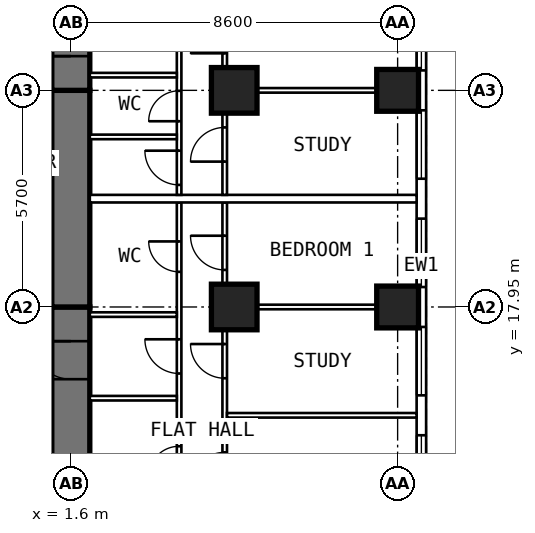
"""IFC4 building model, lengths in metres.
Left out: names, types, materials, properties, quantities, classifications, styles, units other than length and angle.
Written with IfcOpenShell. Run it as: python <this file> out.ifc"""

import sys

from ifc_helpers import new_model, si_unit, direction, frame, frame_2d, origin, origin_2d, place, context, subcontext, project, spatial, rectangle, extrude, element, fill, save


model = new_model("IFC4")
c1 = context("Model", 3, precision=1e-05, world=origin(), true_north=direction((0.0, 1.0)))
c2 = subcontext(c1, "Body", "Model", "MODEL_VIEW")
j1 = project(units=[si_unit("LENGTHUNIT", "METRE"), si_unit("PLANEANGLEUNIT", "RADIAN")], contexts=[c1])
p1 = place(None, origin())
s1 = spatial("IfcSite", under=j1, at=p1, CompositionType="ELEMENT")
p2 = place(p1, origin())
s2 = spatial("IfcBuilding", under=s1, at=p2, CompositionType="ELEMENT")
p3 = place(p2, frame((0.0, 0.0, 28.8)))
s3 = spatial("IfcBuildingStorey", under=s2, at=p3, CompositionType="ELEMENT", Elevation=28.8)
for number, where, z_axis, x_axis in (
    (1, (10.2, 17.95, 0.0), (0.0, 0.0, 1.0), (0.0, 1.0, 0.0)),
    (2, (10.2, 23.65, 0.0), (0.0, 0.0, 1.0), (0.0, 1.0, 0.0)),
):
    element("IfcColumn", number, at=place(p3, frame(where, z_axis=z_axis, x_axis=x_axis)), inside=s3, PredefinedType="COLUMN", context=c2, shape_type="SweptSolid", body=[
        extrude(rectangle(XDim=1.1, YDim=1.1, at=origin_2d()), origin(), (0.0, 0.0, 1.0), 3.6),
    ])
for number, where, z_axis, x_axis in (
    (3, (5.9, 17.95, 0.0), (0.0, 0.0, 1.0), (0.0, 1.0, 0.0)),
    (4, (5.9, 23.65, 0.0), (0.0, 0.0, 1.0), (0.0, 1.0, 0.0)),
):
    element("IfcColumn", number, at=place(p3, frame(where, z_axis=z_axis, x_axis=x_axis)), inside=s3, PredefinedType="COLUMN", context=c2, shape_type="SweptSolid", body=[
        extrude(rectangle(XDim=1.2, YDim=1.2, at=origin_2d()), origin(), (0.0, 0.0, 1.0), 3.6),
    ])
p4 = place(p3, frame((1.6, 9.6, 0.0), z_axis=(0.0, 0.0, 1.0), x_axis=(0.0, 1.0, 0.0)))
e5 = element("IfcWall", 5, at=p4, inside=s3, PredefinedType="SHEAR", context=c2, shape_type="SweptSolid", body=[
    extrude(rectangle(XDim=8.35, YDim=1.0, at=frame_2d((4.175, 0.0))), origin(), (0.0, 0.0, 1.0), 3.6),
])
p5 = place(p4, frame((6.45, 0.0, 0.0)))
e6 = element("IfcOpeningElement", 6, at=p5, cuts=e5, PredefinedType="OPENING", context=c2, shape_type="SweptSolid", body=[
    extrude(rectangle(XDim=1.0, YDim=2.1, at=frame_2d((0.5, 1.05))), frame((0.0, 0.512, 0.0), z_axis=(0.0, -1.0, 0.0), x_axis=(1.0, 0.0, 0.0)), (0.0, 0.0, 1.0), 1.024),
])
p6 = place(p3, frame((1.6, 17.95, 0.0), z_axis=(0.0, 0.0, 1.0), x_axis=(0.0, 1.0, 0.0)))
e7 = element("IfcWall", 7, at=p6, inside=s3, PredefinedType="SHEAR", context=c2, shape_type="SweptSolid", body=[
    extrude(rectangle(XDim=5.7, YDim=1.0, at=frame_2d((2.85, 0.0))), origin(), (0.0, 0.0, 1.0), 3.6),
])
p7 = place(p3, frame((1.6, 23.65, 0.0), z_axis=(0.0, 0.0, 1.0), x_axis=(0.0, 1.0, 0.0)))
e8 = element("IfcWall", 8, at=p7, inside=s3, PredefinedType="SHEAR", context=c2, shape_type="SweptSolid", body=[
    extrude(rectangle(XDim=10.745, YDim=1.0, at=frame_2d((5.373, 0.0))), origin(), (0.0, 0.0, 1.0), 3.6),
])
p8 = place(p7, frame((0.9, 0.0, 0.0)))
e9 = element("IfcOpeningElement", 9, at=p8, cuts=e8, PredefinedType="OPENING", context=c2, shape_type="SweptSolid", body=[
    extrude(rectangle(XDim=1.0, YDim=2.1, at=frame_2d((0.5, 1.05))), frame((0.0, 0.512, 0.0), z_axis=(0.0, -1.0, 0.0), x_axis=(1.0, 0.0, 0.0)), (0.0, 0.0, 1.0), 1.024),
])
p9 = place(p3, frame((10.825, 6.409, 0.0), z_axis=(0.0, 0.0, 1.0), x_axis=(0.0, 1.0, 0.0)))
e10 = element("IfcWall", 10, at=p9, inside=s3, PredefinedType="SOLIDWALL", context=c2, shape_type="SweptSolid", body=[
    extrude(rectangle(XDim=25.226, YDim=0.25, at=frame_2d((12.613, 0.0))), origin(), (0.0, 0.0, 1.0), 3.3),
])
p10 = place(p9, frame((0.666, 0.0, 0.8)))
e11 = element("IfcOpeningElement", 11, at=p10, cuts=e10, PredefinedType="OPENING", context=c2, shape_type="SweptSolid", body=[
    extrude(rectangle(XDim=1.8, YDim=1.8, at=frame_2d((0.9, 0.9))), frame((0.0, 0.137, 0.0), z_axis=(0.0, -1.0, 0.0), x_axis=(1.0, 0.0, 0.0)), (0.0, 0.0, 1.0), 0.274),
])
p11 = place(p9, frame((3.516, 0.0, 0.8)))
e12 = element("IfcOpeningElement", 12, at=p11, cuts=e10, PredefinedType="OPENING", context=c2, shape_type="SweptSolid", body=[
    extrude(rectangle(XDim=1.8, YDim=1.8, at=frame_2d((0.9, 0.9))), frame((0.0, 0.137, 0.0), z_axis=(0.0, -1.0, 0.0), x_axis=(1.0, 0.0, 0.0)), (0.0, 0.0, 1.0), 0.274),
])
p12 = place(p9, frame((6.366, 0.0, 0.8)))
e13 = element("IfcOpeningElement", 13, at=p12, cuts=e10, PredefinedType="OPENING", context=c2, shape_type="SweptSolid", body=[
    extrude(rectangle(XDim=1.8, YDim=1.8, at=frame_2d((0.9, 0.9))), frame((0.0, 0.137, 0.0), z_axis=(0.0, -1.0, 0.0), x_axis=(1.0, 0.0, 0.0)), (0.0, 0.0, 1.0), 0.274),
])
p13 = place(p9, frame((9.216, 0.0, 0.8)))
e14 = element("IfcOpeningElement", 14, at=p13, cuts=e10, PredefinedType="OPENING", context=c2, shape_type="SweptSolid", body=[
    extrude(rectangle(XDim=1.8, YDim=1.8, at=frame_2d((0.9, 0.9))), frame((0.0, 0.137, 0.0), z_axis=(0.0, -1.0, 0.0), x_axis=(1.0, 0.0, 0.0)), (0.0, 0.0, 1.0), 0.274),
])
p14 = place(p9, frame((12.066, 0.0, 0.8)))
e15 = element("IfcOpeningElement", 15, at=p14, cuts=e10, PredefinedType="OPENING", context=c2, shape_type="SweptSolid", body=[
    extrude(rectangle(XDim=1.8, YDim=1.8, at=frame_2d((0.9, 0.9))), frame((0.0, 0.137, 0.0), z_axis=(0.0, -1.0, 0.0), x_axis=(1.0, 0.0, 0.0)), (0.0, 0.0, 1.0), 0.274),
])
p15 = place(p9, frame((14.916, 0.0, 0.8)))
e16 = element("IfcOpeningElement", 16, at=p15, cuts=e10, PredefinedType="OPENING", context=c2, shape_type="SweptSolid", body=[
    extrude(rectangle(XDim=1.8, YDim=1.8, at=frame_2d((0.9, 0.9))), frame((0.0, 0.137, 0.0), z_axis=(0.0, -1.0, 0.0), x_axis=(1.0, 0.0, 0.0)), (0.0, 0.0, 1.0), 0.274),
])
p16 = place(p9, frame((17.766, 0.0, 0.8)))
e17 = element("IfcOpeningElement", 17, at=p16, cuts=e10, PredefinedType="OPENING", context=c2, shape_type="SweptSolid", body=[
    extrude(rectangle(XDim=1.8, YDim=1.8, at=frame_2d((0.9, 0.9))), frame((0.0, 0.137, 0.0), z_axis=(0.0, -1.0, 0.0), x_axis=(1.0, 0.0, 0.0)), (0.0, 0.0, 1.0), 0.274),
])
p17 = place(p9, frame((20.616, 0.0, 0.8)))
e18 = element("IfcOpeningElement", 18, at=p17, cuts=e10, PredefinedType="OPENING", context=c2, shape_type="SweptSolid", body=[
    extrude(rectangle(XDim=1.8, YDim=1.8, at=frame_2d((0.9, 0.9))), frame((0.0, 0.137, 0.0), z_axis=(0.0, -1.0, 0.0), x_axis=(1.0, 0.0, 0.0)), (0.0, 0.0, 1.0), 0.274),
])
p18 = place(p3, frame((4.45, 10.1, 0.0), z_axis=(0.0, 0.0, 1.0), x_axis=(0.0, 1.0, 0.0)))
e19 = element("IfcWall", 19, at=p18, inside=s3, PredefinedType="PARTITIONING", context=c2, shape_type="SweptSolid", body=[
    extrude(rectangle(XDim=10.6, YDim=0.12, at=frame_2d((5.3, 0.0))), origin(), (0.0, 0.0, 1.0), 3.3),
])
p19 = place(p18, frame((0.56, 0.0, 0.0)))
e20 = element("IfcOpeningElement", 20, at=p19, cuts=e19, PredefinedType="OPENING", context=c2, shape_type="SweptSolid", body=[
    extrude(rectangle(XDim=0.9, YDim=2.1, at=frame_2d((0.45, 1.05))), frame((0.0, 0.072, 0.0), z_axis=(0.0, -1.0, 0.0), x_axis=(1.0, 0.0, 0.0)), (0.0, 0.0, 1.0), 0.144),
])
p20 = place(p18, frame((3.385, 0.0, 0.0)))
e21 = element("IfcOpeningElement", 21, at=p20, cuts=e19, PredefinedType="OPENING", context=c2, shape_type="SweptSolid", body=[
    extrude(rectangle(XDim=0.8, YDim=2.1, at=frame_2d((0.4, 1.05))), frame((0.0, 0.072, 0.0), z_axis=(0.0, -1.0, 0.0), x_axis=(1.0, 0.0, 0.0)), (0.0, 0.0, 1.0), 0.144),
])
p21 = place(p18, frame((6.1, 0.0, 0.0)))
e22 = element("IfcOpeningElement", 22, at=p21, cuts=e19, PredefinedType="OPENING", context=c2, shape_type="SweptSolid", body=[
    extrude(rectangle(XDim=0.9, YDim=2.1, at=frame_2d((0.45, 1.05))), frame((0.0, 0.072, 0.0), z_axis=(0.0, -1.0, 0.0), x_axis=(1.0, 0.0, 0.0)), (0.0, 0.0, 1.0), 0.144),
])
p22 = place(p18, frame((8.775, 0.0, 0.0)))
e23 = element("IfcOpeningElement", 23, at=p22, cuts=e19, PredefinedType="OPENING", context=c2, shape_type="SweptSolid", body=[
    extrude(rectangle(XDim=0.8, YDim=2.1, at=frame_2d((0.4, 1.05))), frame((0.0, 0.072, 0.0), z_axis=(0.0, -1.0, 0.0), x_axis=(1.0, 0.0, 0.0)), (0.0, 0.0, 1.0), 0.144),
])
p23 = place(p3, frame((5.65, 9.6, 0.0), z_axis=(0.0, 0.0, 1.0), x_axis=(0.0, 1.0, 0.0)))
e24 = element("IfcWall", 24, at=p23, inside=s3, PredefinedType="PARTITIONING", context=c2, shape_type="SweptSolid", body=[
    extrude(rectangle(XDim=11.1, YDim=0.12, at=frame_2d((5.55, 0.0))), origin(), (0.0, 0.0, 1.0), 3.3),
])
p24 = place(p23, frame((1.0, 0.0, 0.0)))
e25 = element("IfcOpeningElement", 25, at=p24, cuts=e24, PredefinedType="OPENING", context=c2, shape_type="SweptSolid", body=[
    extrude(rectangle(XDim=0.9, YDim=2.1, at=frame_2d((0.45, 1.05))), frame((0.0, 0.072, 0.0), z_axis=(0.0, -1.0, 0.0), x_axis=(1.0, 0.0, 0.0)), (0.0, 0.0, 1.0), 0.144),
])
p25 = place(p23, frame((3.625, 0.0, 0.0)))
e26 = element("IfcOpeningElement", 26, at=p25, cuts=e24, PredefinedType="OPENING", context=c2, shape_type="SweptSolid", body=[
    extrude(rectangle(XDim=0.9, YDim=2.1, at=frame_2d((0.45, 1.05))), frame((0.0, 0.072, 0.0), z_axis=(0.0, -1.0, 0.0), x_axis=(1.0, 0.0, 0.0)), (0.0, 0.0, 1.0), 0.144),
])
p26 = place(p23, frame((6.475, 0.0, 0.0)))
e27 = element("IfcOpeningElement", 27, at=p26, cuts=e24, PredefinedType="OPENING", context=c2, shape_type="SweptSolid", body=[
    extrude(rectangle(XDim=0.9, YDim=2.1, at=frame_2d((0.45, 1.05))), frame((0.0, 0.072, 0.0), z_axis=(0.0, -1.0, 0.0), x_axis=(1.0, 0.0, 0.0)), (0.0, 0.0, 1.0), 0.144),
])
p27 = place(p23, frame((9.325, 0.0, 0.0)))
e28 = element("IfcOpeningElement", 28, at=p27, cuts=e24, PredefinedType="OPENING", context=c2, shape_type="SweptSolid", body=[
    extrude(rectangle(XDim=0.9, YDim=2.1, at=frame_2d((0.45, 1.05))), frame((0.0, 0.072, 0.0), z_axis=(0.0, -1.0, 0.0), x_axis=(1.0, 0.0, 0.0)), (0.0, 0.0, 1.0), 0.144),
])
for number, where, z_axis, x_axis in (
    (29, (5.71, 15.1, 0.0), (0.0, 0.0, 1.0), (1.0, 0.0, 0.0)),
    (30, (5.71, 17.95, 0.0), (0.0, 0.0, 1.0), (1.0, 0.0, 0.0)),
):
    element("IfcWall", number, at=place(p3, frame(where, z_axis=z_axis, x_axis=x_axis)), inside=s3, PredefinedType="PARTITIONING", context=c2, shape_type="SweptSolid", body=[
        extrude(rectangle(XDim=4.99, YDim=0.12, at=frame_2d((2.495, 0.0))), origin(), (0.0, 0.0, 1.0), 3.3),
    ])
for number, where, z_axis, x_axis in (
    (31, (2.1, 15.55, 0.0), (0.0, 0.0, 1.0), (1.0, 0.0, 0.0)),
    (32, (2.1, 17.75, 0.0), (0.0, 0.0, 1.0), (1.0, 0.0, 0.0)),
):
    element("IfcWall", number, at=place(p3, frame(where, z_axis=z_axis, x_axis=x_axis)), inside=s3, PredefinedType="PARTITIONING", context=c2, shape_type="SweptSolid", body=[
        extrude(rectangle(XDim=2.29, YDim=0.12, at=frame_2d((1.145, 0.0))), origin(), (0.0, 0.0, 1.0), 3.3),
    ])
p28 = place(p3, frame((4.45, 20.9, 0.0), z_axis=(0.0, 0.0, 1.0), x_axis=(0.0, 1.0, 0.0)))
e33 = element("IfcWall", 33, at=p28, inside=s3, PredefinedType="PARTITIONING", context=c2, shape_type="SweptSolid", body=[
    extrude(rectangle(XDim=13.495, YDim=0.12, at=frame_2d((6.748, 0.0))), origin(), (0.0, 0.0, 1.0), 3.3),
])
p29 = place(p28, frame((0.262, 0.0, 0.0)))
e34 = element("IfcOpeningElement", 34, at=p29, cuts=e33, PredefinedType="OPENING", context=c2, shape_type="SweptSolid", body=[
    extrude(rectangle(XDim=0.9, YDim=2.1, at=frame_2d((0.45, 1.05))), frame((0.0, 0.072, 0.0), z_axis=(0.0, -1.0, 0.0), x_axis=(1.0, 0.0, 0.0)), (0.0, 0.0, 1.0), 0.144),
])
p30 = place(p28, frame((1.938, 0.0, 0.0)))
e35 = element("IfcOpeningElement", 35, at=p30, cuts=e33, PredefinedType="OPENING", context=c2, shape_type="SweptSolid", body=[
    extrude(rectangle(XDim=0.8, YDim=2.1, at=frame_2d((0.4, 1.05))), frame((0.0, 0.072, 0.0), z_axis=(0.0, -1.0, 0.0), x_axis=(1.0, 0.0, 0.0)), (0.0, 0.0, 1.0), 0.144),
])
p31 = place(p28, frame((3.8, 0.0, 0.0)))
e36 = element("IfcOpeningElement", 36, at=p31, cuts=e33, PredefinedType="OPENING", context=c2, shape_type="SweptSolid", body=[
    extrude(rectangle(XDim=0.9, YDim=2.1, at=frame_2d((0.45, 1.05))), frame((0.0, 0.072, 0.0), z_axis=(0.0, -1.0, 0.0), x_axis=(1.0, 0.0, 0.0)), (0.0, 0.0, 1.0), 0.144),
])
p32 = place(p28, frame((6.342, 0.0, 0.0)))
e37 = element("IfcOpeningElement", 37, at=p32, cuts=e33, PredefinedType="OPENING", context=c2, shape_type="SweptSolid", body=[
    extrude(rectangle(XDim=0.8, YDim=2.1, at=frame_2d((0.4, 1.05))), frame((0.0, 0.072, 0.0), z_axis=(0.0, -1.0, 0.0), x_axis=(1.0, 0.0, 0.0)), (0.0, 0.0, 1.0), 0.144),
])
p33 = place(p28, frame((8.661, 0.0, 0.0)))
e38 = element("IfcOpeningElement", 38, at=p33, cuts=e33, PredefinedType="OPENING", context=c2, shape_type="SweptSolid", body=[
    extrude(rectangle(XDim=0.8, YDim=2.1, at=frame_2d((0.4, 1.05))), frame((0.0, 0.072, 0.0), z_axis=(0.0, -1.0, 0.0), x_axis=(1.0, 0.0, 0.0)), (0.0, 0.0, 1.0), 0.144),
])
p34 = place(p28, frame((10.467, 0.0, 0.0)))
e39 = element("IfcOpeningElement", 39, at=p34, cuts=e33, PredefinedType="OPENING", context=c2, shape_type="SweptSolid", body=[
    extrude(rectangle(XDim=0.9, YDim=2.1, at=frame_2d((0.45, 1.05))), frame((0.0, 0.072, 0.0), z_axis=(0.0, -1.0, 0.0), x_axis=(1.0, 0.0, 0.0)), (0.0, 0.0, 1.0), 0.144),
])
p35 = place(p28, frame((12.004, 0.0, 0.0)))
e40 = element("IfcOpeningElement", 40, at=p35, cuts=e33, PredefinedType="OPENING", context=c2, shape_type="SweptSolid", body=[
    extrude(rectangle(XDim=0.8, YDim=2.1, at=frame_2d((0.4, 1.05))), frame((0.0, 0.072, 0.0), z_axis=(0.0, -1.0, 0.0), x_axis=(1.0, 0.0, 0.0)), (0.0, 0.0, 1.0), 0.144),
])
p36 = place(p3, frame((5.65, 20.9, 0.0), z_axis=(0.0, 0.0, 1.0), x_axis=(0.0, 1.0, 0.0)))
e41 = element("IfcWall", 41, at=p36, inside=s3, PredefinedType="PARTITIONING", context=c2, shape_type="SweptSolid", body=[
    extrude(rectangle(XDim=13.495, YDim=0.12, at=frame_2d((6.748, 0.0))), origin(), (0.0, 0.0, 1.0), 3.3),
])
p37 = place(p36, frame((0.875, 0.0, 0.0)))
e42 = element("IfcOpeningElement", 42, at=p37, cuts=e41, PredefinedType="OPENING", context=c2, shape_type="SweptSolid", body=[
    extrude(rectangle(XDim=0.9, YDim=2.1, at=frame_2d((0.45, 1.05))), frame((0.0, 0.072, 0.0), z_axis=(0.0, -1.0, 0.0), x_axis=(1.0, 0.0, 0.0)), (0.0, 0.0, 1.0), 0.144),
])
p38 = place(p36, frame((3.725, 0.0, 0.0)))
e43 = element("IfcOpeningElement", 43, at=p38, cuts=e41, PredefinedType="OPENING", context=c2, shape_type="SweptSolid", body=[
    extrude(rectangle(XDim=0.9, YDim=2.1, at=frame_2d((0.45, 1.05))), frame((0.0, 0.072, 0.0), z_axis=(0.0, -1.0, 0.0), x_axis=(1.0, 0.0, 0.0)), (0.0, 0.0, 1.0), 0.144),
])
p39 = place(p36, frame((6.575, 0.0, 0.0)))
e44 = element("IfcOpeningElement", 44, at=p39, cuts=e41, PredefinedType="OPENING", context=c2, shape_type="SweptSolid", body=[
    extrude(rectangle(XDim=0.9, YDim=2.1, at=frame_2d((0.45, 1.05))), frame((0.0, 0.072, 0.0), z_axis=(0.0, -1.0, 0.0), x_axis=(1.0, 0.0, 0.0)), (0.0, 0.0, 1.0), 0.144),
])
p40 = place(p36, frame((9.2, 0.0, 0.0)))
e45 = element("IfcOpeningElement", 45, at=p40, cuts=e41, PredefinedType="OPENING", context=c2, shape_type="SweptSolid", body=[
    extrude(rectangle(XDim=0.9, YDim=2.1, at=frame_2d((0.45, 1.05))), frame((0.0, 0.072, 0.0), z_axis=(0.0, -1.0, 0.0), x_axis=(1.0, 0.0, 0.0)), (0.0, 0.0, 1.0), 0.144),
])
p41 = place(p3, frame((5.71, 23.65, 0.0), z_axis=(0.0, 0.0, 1.0), x_axis=(1.0, 0.0, 0.0)))
e46 = element("IfcWall", 46, at=p41, inside=s3, PredefinedType="PARTITIONING", context=c2, shape_type="SweptSolid", body=[
    extrude(rectangle(XDim=4.99, YDim=0.12, at=frame_2d((2.495, 0.0))), origin(), (0.0, 0.0, 1.0), 3.3),
])
for number, where, z_axis, x_axis in (
    (47, (2.1, 22.425, 0.0), (0.0, 0.0, 1.0), (1.0, 0.0, 0.0)),
    (48, (2.1, 24.05, 0.0), (0.0, 0.0, 1.0), (1.0, 0.0, 0.0)),
):
    element("IfcWall", number, at=place(p3, frame(where, z_axis=z_axis, x_axis=x_axis)), inside=s3, PredefinedType="PARTITIONING", context=c2, shape_type="SweptSolid", body=[
        extrude(rectangle(XDim=2.29, YDim=0.12, at=frame_2d((1.145, 0.0))), origin(), (0.0, 0.0, 1.0), 3.3),
    ])
p42 = place(p3, frame((2.1, 20.8, 0.0), z_axis=(0.0, 0.0, 1.0), x_axis=(1.0, 0.0, 0.0)))
e49 = element("IfcWall", 49, at=p42, inside=s3, PredefinedType="PARTITIONING", context=c2, shape_type="SweptSolid", body=[
    extrude(rectangle(XDim=8.6, YDim=0.2, at=frame_2d((4.3, 0.0))), origin(), (0.0, 0.0, 1.0), 3.3),
])
p43 = place(p12, origin())
e50 = element("IfcWindow", 50, at=p43, inside=s3, PartitioningType="SINGLE_PANEL", PredefinedType="WINDOW", context=c2, shape_type="SweptSolid", body=[
    extrude(rectangle(XDim=1.8, YDim=1.8, at=frame_2d((0.9, 0.9))), frame((0.0, 0.03, 0.0), z_axis=(0.0, -1.0, 0.0), x_axis=(1.0, 0.0, 0.0)), (0.0, 0.0, 1.0), 0.06),
])
fill(e13, e50)
p44 = place(p13, origin())
e51 = element("IfcWindow", 51, at=p44, inside=s3, PartitioningType="SINGLE_PANEL", PredefinedType="WINDOW", context=c2, shape_type="SweptSolid", body=[
    extrude(rectangle(XDim=1.8, YDim=1.8, at=frame_2d((0.9, 0.9))), frame((0.0, 0.03, 0.0), z_axis=(0.0, -1.0, 0.0), x_axis=(1.0, 0.0, 0.0)), (0.0, 0.0, 1.0), 0.06),
])
fill(e14, e51)
p45 = place(p14, origin())
e52 = element("IfcWindow", 52, at=p45, inside=s3, PartitioningType="SINGLE_PANEL", PredefinedType="WINDOW", context=c2, shape_type="SweptSolid", body=[
    extrude(rectangle(XDim=1.8, YDim=1.8, at=frame_2d((0.9, 0.9))), frame((0.0, 0.03, 0.0), z_axis=(0.0, -1.0, 0.0), x_axis=(1.0, 0.0, 0.0)), (0.0, 0.0, 1.0), 0.06),
])
fill(e15, e52)
p46 = place(p15, origin())
e53 = element("IfcWindow", 53, at=p46, inside=s3, PartitioningType="SINGLE_PANEL", PredefinedType="WINDOW", context=c2, shape_type="SweptSolid", body=[
    extrude(rectangle(XDim=1.8, YDim=1.8, at=frame_2d((0.9, 0.9))), frame((0.0, 0.03, 0.0), z_axis=(0.0, -1.0, 0.0), x_axis=(1.0, 0.0, 0.0)), (0.0, 0.0, 1.0), 0.06),
])
fill(e16, e53)
p47 = place(p16, origin())
e54 = element("IfcWindow", 54, at=p47, inside=s3, PartitioningType="SINGLE_PANEL", PredefinedType="WINDOW", context=c2, shape_type="SweptSolid", body=[
    extrude(rectangle(XDim=1.8, YDim=1.8, at=frame_2d((0.9, 0.9))), frame((0.0, 0.03, 0.0), z_axis=(0.0, -1.0, 0.0), x_axis=(1.0, 0.0, 0.0)), (0.0, 0.0, 1.0), 0.06),
])
fill(e17, e54)
p48 = place(p5, origin())
e55 = element("IfcDoor", 55, at=p48, inside=s3, OperationType="SINGLE_SWING_RIGHT", PredefinedType="DOOR", context=c2, shape_type="SweptSolid", body=[
    extrude(rectangle(XDim=1.0, YDim=2.1, at=frame_2d((0.5, 1.05))), frame((0.0, 0.25, 0.0), z_axis=(0.0, -1.0, 0.0), x_axis=(1.0, 0.0, 0.0)), (0.0, 0.0, 1.0), 0.5),
])
fill(e6, e55)
p49 = place(p25, origin())
e56 = element("IfcDoor", 56, at=p49, inside=s3, OperationType="SINGLE_SWING_LEFT", PredefinedType="DOOR", context=c2, shape_type="SweptSolid", body=[
    extrude(rectangle(XDim=0.9, YDim=2.1, at=frame_2d((0.45, 1.05))), frame((0.0, 0.025, 0.0), z_axis=(0.0, -1.0, 0.0), x_axis=(1.0, 0.0, 0.0)), (0.0, 0.0, 1.0), 0.05),
])
fill(e26, e56)
p50 = place(p26, origin())
e57 = element("IfcDoor", 57, at=p50, inside=s3, OperationType="SINGLE_SWING_RIGHT", PredefinedType="DOOR", context=c2, shape_type="SweptSolid", body=[
    extrude(rectangle(XDim=0.9, YDim=2.1, at=frame_2d((0.45, 1.05))), frame((0.0, 0.025, 0.0), z_axis=(0.0, -1.0, 0.0), x_axis=(1.0, 0.0, 0.0)), (0.0, 0.0, 1.0), 0.05),
])
fill(e27, e57)
p51 = place(p27, origin())
e58 = element("IfcDoor", 58, at=p51, inside=s3, OperationType="SINGLE_SWING_RIGHT", PredefinedType="DOOR", context=c2, shape_type="SweptSolid", body=[
    extrude(rectangle(XDim=0.9, YDim=2.1, at=frame_2d((0.45, 1.05))), frame((0.0, 0.025, 0.0), z_axis=(0.0, -1.0, 0.0), x_axis=(1.0, 0.0, 0.0)), (0.0, 0.0, 1.0), 0.05),
])
fill(e28, e58)
p52 = place(p20, origin())
e59 = element("IfcDoor", 59, at=p52, inside=s3, OperationType="SINGLE_SWING_LEFT", PredefinedType="DOOR", context=c2, shape_type="SweptSolid", body=[
    extrude(rectangle(XDim=0.8, YDim=2.1, at=frame_2d((0.4, 1.05))), frame((0.0, 0.025, 0.0), z_axis=(0.0, -1.0, 0.0), x_axis=(1.0, 0.0, 0.0)), (0.0, 0.0, 1.0), 0.05),
])
fill(e21, e59)
p53 = place(p21, origin())
e60 = element("IfcDoor", 60, at=p53, inside=s3, OperationType="SINGLE_SWING_RIGHT", PredefinedType="DOOR", context=c2, shape_type="SweptSolid", body=[
    extrude(rectangle(XDim=0.9, YDim=2.1, at=frame_2d((0.45, 1.05))), frame((0.0, 0.025, 0.0), z_axis=(0.0, -1.0, 0.0), x_axis=(1.0, 0.0, 0.0)), (0.0, 0.0, 1.0), 0.05),
])
fill(e22, e60)
p54 = place(p22, origin())
e61 = element("IfcDoor", 61, at=p54, inside=s3, OperationType="SINGLE_SWING_RIGHT", PredefinedType="DOOR", context=c2, shape_type="SweptSolid", body=[
    extrude(rectangle(XDim=0.8, YDim=2.1, at=frame_2d((0.4, 1.05))), frame((0.0, 0.025, 0.0), z_axis=(0.0, -1.0, 0.0), x_axis=(1.0, 0.0, 0.0)), (0.0, 0.0, 1.0), 0.05),
])
fill(e23, e61)
p55 = place(p8, origin())
e62 = element("IfcDoor", 62, at=p55, inside=s3, OperationType="SINGLE_SWING_LEFT", PredefinedType="DOOR", context=c2, shape_type="SweptSolid", body=[
    extrude(rectangle(XDim=1.0, YDim=2.1, at=frame_2d((0.5, 1.05))), frame((0.0, 0.25, 0.0), z_axis=(0.0, -1.0, 0.0), x_axis=(1.0, 0.0, 0.0)), (0.0, 0.0, 1.0), 0.5),
])
fill(e9, e62)
p56 = place(p37, origin())
e63 = element("IfcDoor", 63, at=p56, inside=s3, OperationType="SINGLE_SWING_LEFT", PredefinedType="DOOR", context=c2, shape_type="SweptSolid", body=[
    extrude(rectangle(XDim=0.9, YDim=2.1, at=frame_2d((0.45, 1.05))), frame((0.0, 0.025, 0.0), z_axis=(0.0, -1.0, 0.0), x_axis=(1.0, 0.0, 0.0)), (0.0, 0.0, 1.0), 0.05),
])
fill(e42, e63)
p57 = place(p38, origin())
e64 = element("IfcDoor", 64, at=p57, inside=s3, OperationType="SINGLE_SWING_LEFT", PredefinedType="DOOR", context=c2, shape_type="SweptSolid", body=[
    extrude(rectangle(XDim=0.9, YDim=2.1, at=frame_2d((0.45, 1.05))), frame((0.0, 0.025, 0.0), z_axis=(0.0, -1.0, 0.0), x_axis=(1.0, 0.0, 0.0)), (0.0, 0.0, 1.0), 0.05),
])
fill(e43, e64)
p58 = place(p29, origin())
e65 = element("IfcDoor", 65, at=p58, inside=s3, OperationType="SINGLE_SWING_RIGHT", PredefinedType="DOOR", context=c2, shape_type="SweptSolid", body=[
    extrude(rectangle(XDim=0.9, YDim=2.1, at=frame_2d((0.45, 1.05))), frame((0.0, 0.025, 0.0), z_axis=(0.0, -1.0, 0.0), x_axis=(1.0, 0.0, 0.0)), (0.0, 0.0, 1.0), 0.05),
])
fill(e34, e65)
p59 = place(p30, origin())
e66 = element("IfcDoor", 66, at=p59, inside=s3, OperationType="SINGLE_SWING_LEFT", PredefinedType="DOOR", context=c2, shape_type="SweptSolid", body=[
    extrude(rectangle(XDim=0.8, YDim=2.1, at=frame_2d((0.4, 1.05))), frame((0.0, 0.025, 0.0), z_axis=(0.0, -1.0, 0.0), x_axis=(1.0, 0.0, 0.0)), (0.0, 0.0, 1.0), 0.05),
])
fill(e35, e66)
save(model, sys.argv[1])
